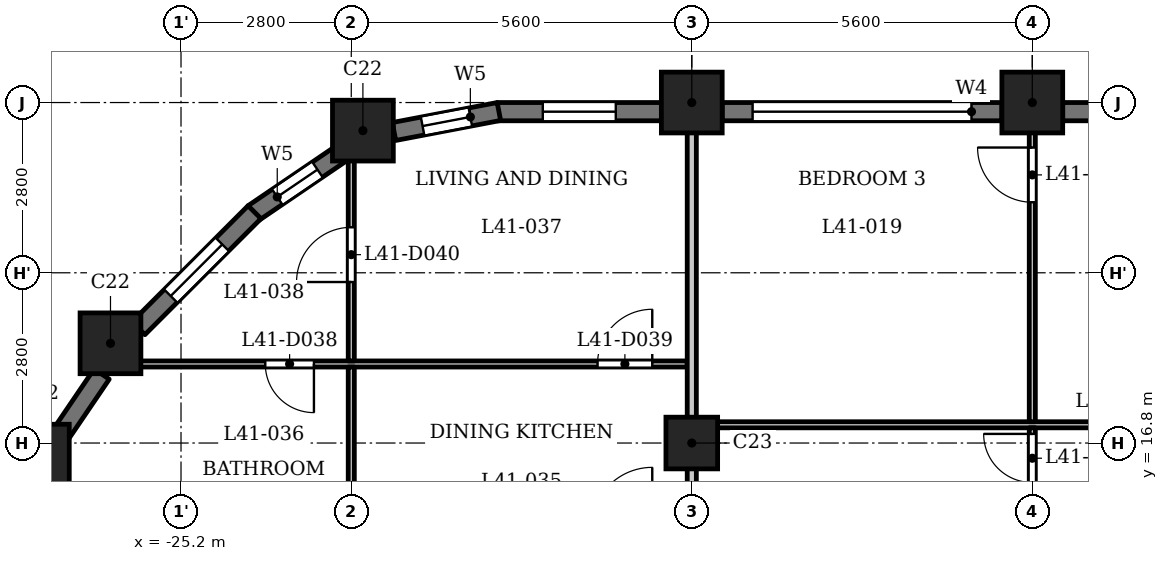
"""IFC4 building model, lengths in metres.
Left out: names, types, materials, properties, quantities, classifications, styles, units other than length and angle.
Written with IfcOpenShell. Run it as: python <this file> out.ifc"""

import sys

from ifc_helpers import new_model, si_unit, direction, frame, frame_2d, origin, origin_2d, place, context, subcontext, project, spatial, rectangle, extrude, element, fill, save


model = new_model("IFC4")
c1 = context("Model", 3, precision=1e-05, world=origin(), true_north=direction((0.0, 1.0)))
c2 = subcontext(c1, "Body", "Model", "MODEL_VIEW")
j1 = project(units=[si_unit("LENGTHUNIT", "METRE"), si_unit("PLANEANGLEUNIT", "RADIAN")], contexts=[c1])
p1 = place(None, origin())
s1 = spatial("IfcSite", under=j1, at=p1, CompositionType="ELEMENT")
p2 = place(p1, origin())
s2 = spatial("IfcBuilding", under=s1, at=p2, CompositionType="ELEMENT")
p3 = place(p2, frame((0.0, 0.0, 160.6)))
s3 = spatial("IfcBuildingStorey", under=s2, at=p3, CompositionType="ELEMENT", Elevation=160.6)
for number, where, z_axis, x_axis in (
    (1, (-11.2, 22.4, 0.0), (0.0, 0.0, 1.0), (1.0, 0.0, 0.0)),
    (2, (-16.8, 22.4, 0.0), (0.0, 0.0, 1.0), (1.0, 0.0, 0.0)),
    (3, (-22.209, 21.938, 0.0), (0.0, 0.0, 1.0), (1.0, 0.0, 0.0)),
    (4, (-26.36, 18.44, 0.0), (0.0, 0.0, 1.0), (1.0, 0.0, 0.0)),
    (5, (-27.538, 16.609, 0.0), (0.0, 0.0, 1.0), (1.0, 0.0, 0.0)),
):
    element("IfcColumn", number, at=place(p3, frame(where, z_axis=z_axis, x_axis=x_axis)), inside=s3, PredefinedType="COLUMN", context=c2, shape_type="SweptSolid", body=[
        extrude(rectangle(XDim=1.0, YDim=1.0, at=origin_2d()), origin(), (0.0, 0.0, 1.0), 3.5),
    ])
p4 = place(p3, frame((-16.8, 16.8, 0.0), z_axis=(0.0, 0.0, 1.0), x_axis=(1.0, 0.0, 0.0)))
e6 = element("IfcColumn", 6, at=p4, inside=s3, PredefinedType="COLUMN", context=c2, shape_type="SweptSolid", body=[
    extrude(rectangle(XDim=0.85, YDim=0.85, at=origin_2d()), origin(), (0.0, 0.0, 1.0), 3.5),
])
p5 = place(p3, frame((-6.1, 22.25, 0.0), z_axis=(0.0, 0.0, 1.0), x_axis=(-1.0, 0.0, 0.0)))
e7 = element("IfcWall", 7, at=p5, inside=s3, PredefinedType="SOLIDWALL", context=c2, shape_type="SweptSolid", body=[
    extrude(rectangle(XDim=4.6, YDim=0.3, at=frame_2d((2.3, 0.0))), origin(), (0.0, 0.0, 1.0), 2.45),
])
p6 = place(p5, frame((0.5, 0.0, 1.2)))
e8 = element("IfcOpeningElement", 8, at=p6, cuts=e7, PredefinedType="OPENING", context=c2, shape_type="SweptSolid", body=[
    extrude(rectangle(XDim=3.6, YDim=0.95, at=frame_2d((1.8, 0.475))), frame((0.0, 0.16, 0.0), z_axis=(0.0, -1.0, 0.0), x_axis=(1.0, 0.0, 0.0)), (0.0, 0.0, 1.0), 0.32),
])
p7 = place(p3, frame((-11.7, 22.25, 0.0), z_axis=(0.0, 0.0, 1.0), x_axis=(-1.0, 0.0, 0.0)))
e9 = element("IfcWall", 9, at=p7, inside=s3, PredefinedType="SOLIDWALL", context=c2, shape_type="SweptSolid", body=[
    extrude(rectangle(XDim=4.6, YDim=0.3, at=frame_2d((2.3, 0.0))), origin(), (0.0, 0.0, 1.0), 2.45),
])
p8 = place(p7, frame((0.5, 0.0, 1.2)))
e10 = element("IfcOpeningElement", 10, at=p8, cuts=e9, PredefinedType="OPENING", context=c2, shape_type="SweptSolid", body=[
    extrude(rectangle(XDim=3.6, YDim=0.95, at=frame_2d((1.8, 0.475))), frame((0.0, 0.16, 0.0), z_axis=(0.0, -1.0, 0.0), x_axis=(1.0, 0.0, 0.0)), (0.0, 0.0, 1.0), 0.32),
])
p9 = place(p3, frame((-17.3, 22.25, 0.0), z_axis=(0.0, 0.0, 1.0), x_axis=(-1.0, 0.0, 0.0)))
e11 = element("IfcWall", 11, at=p9, inside=s3, PredefinedType="SOLIDWALL", context=c2, shape_type="SweptSolid", body=[
    extrude(rectangle(XDim=2.7, YDim=0.3, at=frame_2d((1.35, 0.0))), origin(), (0.0, 0.0, 1.0), 2.45),
])
p10 = place(p9, frame((0.75, 0.0, 0.6)))
e12 = element("IfcOpeningElement", 12, at=p10, cuts=e11, PredefinedType="OPENING", context=c2, shape_type="SweptSolid", body=[
    extrude(rectangle(XDim=1.2, YDim=1.55, at=frame_2d((0.6, 0.775))), frame((0.0, 0.16, 0.0), z_axis=(0.0, -1.0, 0.0), x_axis=(1.0, 0.0, 0.0)), (0.0, 0.0, 1.0), 0.32),
])
p11 = place(p3, frame((-19.972, 22.253, 0.0), z_axis=(0.0, 0.0, 1.0), x_axis=(-0.982284988433, -0.187393173565, 0.0)))
e13 = element("IfcWall", 13, at=p11, inside=s3, PredefinedType="SOLIDWALL", context=c2, shape_type="SweptSolid", body=[
    extrude(rectangle(XDim=1.756, YDim=0.3, at=frame_2d((0.878, 0.0))), origin(), (0.0, 0.0, 1.0), 2.45),
])
p12 = place(p11, frame((0.478, 0.0, 0.6)))
e14 = element("IfcOpeningElement", 14, at=p12, cuts=e13, PredefinedType="OPENING", context=c2, shape_type="SweptSolid", body=[
    extrude(rectangle(XDim=0.8, YDim=1.55, at=frame_2d((0.4, 0.775))), frame((0.0, 0.16, 0.0), z_axis=(0.0, -1.0, 0.0), x_axis=(1.0, 0.0, 0.0)), (0.0, 0.0, 1.0), 0.32),
])
p13 = place(p3, frame((-22.56, 21.566, 0.0), z_axis=(0.0, 0.0, 1.0), x_axis=(-0.82707645233, -0.562089443061, 0.0)))
e15 = element("IfcWall", 15, at=p13, inside=s3, PredefinedType="SOLIDWALL", context=c2, shape_type="SweptSolid", body=[
    extrude(rectangle(XDim=1.756, YDim=0.3, at=frame_2d((0.878, 0.0))), origin(), (0.0, 0.0, 1.0), 2.45),
])
p14 = place(p13, frame((0.478, 0.0, 0.6)))
e16 = element("IfcOpeningElement", 16, at=p14, cuts=e15, PredefinedType="OPENING", context=c2, shape_type="SweptSolid", body=[
    extrude(rectangle(XDim=0.8, YDim=1.55, at=frame_2d((0.4, 0.775))), frame((0.0, 0.16, 0.0), z_axis=(0.0, -1.0, 0.0), x_axis=(1.0, 0.0, 0.0)), (0.0, 0.0, 1.0), 0.32),
])
p15 = place(p3, frame((-23.991, 20.597, 0.0), z_axis=(0.0, 0.0, 1.0), x_axis=(-0.707106781187, -0.707106781187, 0.0)))
e17 = element("IfcWall", 17, at=p15, inside=s3, PredefinedType="SOLIDWALL", context=c2, shape_type="SweptSolid", body=[
    extrude(rectangle(XDim=2.7, YDim=0.3, at=frame_2d((1.35, 0.0))), origin(), (0.0, 0.0, 1.0), 2.45),
])
p16 = place(p15, frame((0.75, 0.0, 0.6)))
e18 = element("IfcOpeningElement", 18, at=p16, cuts=e17, PredefinedType="OPENING", context=c2, shape_type="SweptSolid", body=[
    extrude(rectangle(XDim=1.2, YDim=1.55, at=frame_2d((0.6, 0.775))), frame((0.0, 0.16, 0.0), z_axis=(0.0, -1.0, 0.0), x_axis=(1.0, 0.0, 0.0)), (0.0, 0.0, 1.0), 0.32),
])
p17 = place(p3, frame((-26.504, 17.934, 0.0), z_axis=(0.0, 0.0, 1.0), x_axis=(-0.562145470373, -0.827038372833, 0.0)))
e19 = element("IfcWall", 19, at=p17, inside=s3, PredefinedType="SOLIDWALL", context=c2, shape_type="SweptSolid", body=[
    extrude(rectangle(XDim=1.177, YDim=0.3, at=frame_2d((0.588, 0.0))), origin(), (0.0, 0.0, 1.0), 3.2),
])
p18 = place(p3, frame((-16.725, 17.1, 0.0), z_axis=(0.0, 0.0, 1.0), x_axis=(1.0, 0.0, 0.0)))
e20 = element("IfcWall", 20, at=p18, inside=s3, PredefinedType="PARTITIONING", context=c2, shape_type="SweptSolid", body=[
    extrude(rectangle(XDim=33.45, YDim=0.1, at=frame_2d((16.725, 0.0))), origin(), (0.0, 0.0, 1.0), 3.2),
])
p19 = place(p18, frame((11.925, 0.0, 0.0)))
e21 = element("IfcOpeningElement", 21, at=p19, cuts=e20, PredefinedType="OPENING", context=c2, shape_type="SweptSolid", body=[
    extrude(rectangle(XDim=0.9, YDim=2.1, at=frame_2d((0.45, 1.05))), frame((0.0, 0.06, 0.0), z_axis=(0.0, -1.0, 0.0), x_axis=(1.0, 0.0, 0.0)), (0.0, 0.0, 1.0), 0.12),
])
p20 = place(p18, frame((15.175, 0.0, 0.0)))
e22 = element("IfcOpeningElement", 22, at=p20, cuts=e20, PredefinedType="OPENING", context=c2, shape_type="SweptSolid", body=[
    extrude(rectangle(XDim=0.9, YDim=2.1, at=frame_2d((0.45, 1.05))), frame((0.0, 0.06, 0.0), z_axis=(0.0, -1.0, 0.0), x_axis=(1.0, 0.0, 0.0)), (0.0, 0.0, 1.0), 0.12),
])
p21 = place(p18, frame((6.575, 0.0, 0.0)))
e23 = element("IfcOpeningElement", 23, at=p21, cuts=e20, PredefinedType="OPENING", context=c2, shape_type="SweptSolid", body=[
    extrude(rectangle(XDim=0.9, YDim=2.1, at=frame_2d((0.45, 1.05))), frame((0.0, 0.06, 0.0), z_axis=(0.0, -1.0, 0.0), x_axis=(1.0, 0.0, 0.0)), (0.0, 0.0, 1.0), 0.12),
])
p22 = place(p18, frame((17.375, 0.0, 0.0)))
e24 = element("IfcOpeningElement", 24, at=p22, cuts=e20, PredefinedType="OPENING", context=c2, shape_type="SweptSolid", body=[
    extrude(rectangle(XDim=0.8, YDim=2.1, at=frame_2d((0.4, 1.05))), frame((0.0, 0.06, 0.0), z_axis=(0.0, -1.0, 0.0), x_axis=(1.0, 0.0, 0.0)), (0.0, 0.0, 1.0), 0.12),
])
p23 = place(p18, frame((20.025, 0.0, 0.0)))
e25 = element("IfcOpeningElement", 25, at=p23, cuts=e20, PredefinedType="OPENING", context=c2, shape_type="SweptSolid", body=[
    extrude(rectangle(XDim=0.9, YDim=2.1, at=frame_2d((0.45, 1.05))), frame((0.0, 0.06, 0.0), z_axis=(0.0, -1.0, 0.0), x_axis=(1.0, 0.0, 0.0)), (0.0, 0.0, 1.0), 0.12),
])
p24 = place(p18, frame((26.425, 0.0, 0.0)))
e26 = element("IfcOpeningElement", 26, at=p24, cuts=e20, PredefinedType="OPENING", context=c2, shape_type="SweptSolid", body=[
    extrude(rectangle(XDim=0.8, YDim=2.1, at=frame_2d((0.4, 1.05))), frame((0.0, 0.06, 0.0), z_axis=(0.0, -1.0, 0.0), x_axis=(1.0, 0.0, 0.0)), (0.0, 0.0, 1.0), 0.12),
])
p25 = place(p18, frame((23.025, 0.0, 0.0)))
e27 = element("IfcOpeningElement", 27, at=p25, cuts=e20, PredefinedType="OPENING", context=c2, shape_type="SweptSolid", body=[
    extrude(rectangle(XDim=0.9, YDim=2.1, at=frame_2d((0.45, 1.05))), frame((0.0, 0.06, 0.0), z_axis=(0.0, -1.0, 0.0), x_axis=(1.0, 0.0, 0.0)), (0.0, 0.0, 1.0), 0.12),
])
p26 = place(p18, frame((28.575, 0.0, 0.0)))
e28 = element("IfcOpeningElement", 28, at=p26, cuts=e20, PredefinedType="OPENING", context=c2, shape_type="SweptSolid", body=[
    extrude(rectangle(XDim=0.8, YDim=2.1, at=frame_2d((0.4, 1.05))), frame((0.0, 0.06, 0.0), z_axis=(0.0, -1.0, 0.0), x_axis=(1.0, 0.0, 0.0)), (0.0, 0.0, 1.0), 0.12),
])
p27 = place(p18, frame((30.725, 0.0, 0.0)))
e29 = element("IfcOpeningElement", 29, at=p27, cuts=e20, PredefinedType="OPENING", context=c2, shape_type="SweptSolid", body=[
    extrude(rectangle(XDim=0.9, YDim=2.1, at=frame_2d((0.45, 1.05))), frame((0.0, 0.06, 0.0), z_axis=(0.0, -1.0, 0.0), x_axis=(1.0, 0.0, 0.0)), (0.0, 0.0, 1.0), 0.12),
])
p28 = place(p3, frame((-26.44, 18.1, 0.0), z_axis=(0.0, 0.0, 1.0), x_axis=(1.0, 0.0, 0.0)))
e30 = element("IfcWall", 30, at=p28, inside=s3, PredefinedType="PARTITIONING", context=c2, shape_type="SweptSolid", body=[
    extrude(rectangle(XDim=9.565, YDim=0.1, at=frame_2d((4.782, 0.0))), origin(), (0.0, 0.0, 1.0), 3.2),
])
p29 = place(p28, frame((2.626, 0.0, 0.0)))
e31 = element("IfcOpeningElement", 31, at=p29, cuts=e30, PredefinedType="OPENING", context=c2, shape_type="SweptSolid", body=[
    extrude(rectangle(XDim=0.8, YDim=2.1, at=frame_2d((0.4, 1.05))), frame((0.0, 0.06, 0.0), z_axis=(0.0, -1.0, 0.0), x_axis=(1.0, 0.0, 0.0)), (0.0, 0.0, 1.0), 0.12),
])
p30 = place(p28, frame((8.09, 0.0, 0.0)))
e32 = element("IfcOpeningElement", 32, at=p30, cuts=e30, PredefinedType="OPENING", context=c2, shape_type="SweptSolid", body=[
    extrude(rectangle(XDim=0.9, YDim=2.1, at=frame_2d((0.45, 1.05))), frame((0.0, 0.06, 0.0), z_axis=(0.0, -1.0, 0.0), x_axis=(1.0, 0.0, 0.0)), (0.0, 0.0, 1.0), 0.12),
])
p31 = place(p3, frame((-22.4, 15.475, 0.0), z_axis=(0.0, 0.0, 1.0), x_axis=(0.0, 1.0, 0.0)))
e33 = element("IfcWall", 33, at=p31, inside=s3, PredefinedType="PARTITIONING", context=c2, shape_type="SweptSolid", body=[
    extrude(rectangle(XDim=2.575, YDim=0.1, at=frame_2d((1.288, 0.0))), origin(), (0.0, 0.0, 1.0), 3.2),
])
p32 = place(p3, frame((-22.4, 18.15, 0.0), z_axis=(0.0, 0.0, 1.0), x_axis=(0.0, 1.0, 0.0)))
e34 = element("IfcWall", 34, at=p32, inside=s3, PredefinedType="PARTITIONING", context=c2, shape_type="SweptSolid", body=[
    extrude(rectangle(XDim=3.57, YDim=0.1, at=frame_2d((1.785, 0.0))), origin(), (0.0, 0.0, 1.0), 3.2),
])
p33 = place(p32, frame((1.298, 0.0, 0.0)))
e35 = element("IfcOpeningElement", 35, at=p33, cuts=e34, PredefinedType="OPENING", context=c2, shape_type="SweptSolid", body=[
    extrude(rectangle(XDim=0.9, YDim=2.1, at=frame_2d((0.45, 1.05))), frame((0.0, 0.06, 0.0), z_axis=(0.0, -1.0, 0.0), x_axis=(1.0, 0.0, 0.0)), (0.0, 0.0, 1.0), 0.12),
])
p34 = place(p3, frame((-16.8, 15.475, 0.0), z_axis=(0.0, 0.0, 1.0), x_axis=(0.0, 1.0, 0.0)))
e36 = element("IfcWall", 36, at=p34, inside=s3, PredefinedType="PARTITIONING", context=c2, shape_type="SweptSolid", body=[
    extrude(rectangle(XDim=7.405, YDim=0.15, at=frame_2d((3.702, 0.0))), origin(), (0.0, 0.0, 1.0), 3.2),
])
p35 = place(p3, frame((-11.2, 13.275, 0.0), z_axis=(0.0, 0.0, 1.0), x_axis=(0.0, 1.0, 0.0)))
e37 = element("IfcWall", 37, at=p35, inside=s3, PredefinedType="PARTITIONING", context=c2, shape_type="SweptSolid", body=[
    extrude(rectangle(XDim=3.775, YDim=0.1, at=frame_2d((1.888, 0.0))), origin(), (0.0, 0.0, 1.0), 3.2),
])
p36 = place(p35, frame((2.875, 0.0, 0.0)))
e38 = element("IfcOpeningElement", 38, at=p36, cuts=e37, PredefinedType="OPENING", context=c2, shape_type="SweptSolid", body=[
    extrude(rectangle(XDim=0.8, YDim=2.1, at=frame_2d((0.4, 1.05))), frame((0.0, 0.06, 0.0), z_axis=(0.0, -1.0, 0.0), x_axis=(1.0, 0.0, 0.0)), (0.0, 0.0, 1.0), 0.12),
])
p37 = place(p3, frame((-11.2, 17.15, 0.0), z_axis=(0.0, 0.0, 1.0), x_axis=(0.0, 1.0, 0.0)))
e39 = element("IfcWall", 39, at=p37, inside=s3, PredefinedType="PARTITIONING", context=c2, shape_type="SweptSolid", body=[
    extrude(rectangle(XDim=5.73, YDim=0.1, at=frame_2d((2.865, 0.0))), origin(), (0.0, 0.0, 1.0), 3.2),
])
p38 = place(p37, frame((3.61, 0.0, 0.0)))
e40 = element("IfcOpeningElement", 40, at=p38, cuts=e39, PredefinedType="OPENING", context=c2, shape_type="SweptSolid", body=[
    extrude(rectangle(XDim=0.9, YDim=2.1, at=frame_2d((0.45, 1.05))), frame((0.0, 0.06, 0.0), z_axis=(0.0, -1.0, 0.0), x_axis=(1.0, 0.0, 0.0)), (0.0, 0.0, 1.0), 0.12),
])
p39 = place(p36, origin())
e41 = element("IfcDoor", 41, at=p39, inside=s3, OperationType="SINGLE_SWING_LEFT", PredefinedType="DOOR", context=c2, shape_type="SweptSolid", body=[
    extrude(rectangle(XDim=0.8, YDim=2.1, at=frame_2d((0.4, 1.05))), frame((0.0, 0.025, 0.0), z_axis=(0.0, -1.0, 0.0), x_axis=(1.0, 0.0, 0.0)), (0.0, 0.0, 1.0), 0.05),
])
fill(e38, e41)
p40 = place(p38, origin())
e42 = element("IfcDoor", 42, at=p40, inside=s3, OperationType="SINGLE_SWING_LEFT", PredefinedType="DOOR", context=c2, shape_type="SweptSolid", body=[
    extrude(rectangle(XDim=0.9, YDim=2.1, at=frame_2d((0.45, 1.05))), frame((0.0, 0.025, 0.0), z_axis=(0.0, -1.0, 0.0), x_axis=(1.0, 0.0, 0.0)), (0.0, 0.0, 1.0), 0.05),
])
fill(e40, e42)
p41 = place(p29, origin())
e43 = element("IfcDoor", 43, at=p41, inside=s3, OperationType="SINGLE_SWING_RIGHT", PredefinedType="DOOR", context=c2, shape_type="SweptSolid", body=[
    extrude(rectangle(XDim=0.8, YDim=2.1, at=frame_2d((0.4, 1.05))), frame((0.0, 0.025, 0.0), z_axis=(0.0, -1.0, 0.0), x_axis=(1.0, 0.0, 0.0)), (0.0, 0.0, 1.0), 0.05),
])
fill(e31, e43)
p42 = place(p30, origin())
e44 = element("IfcDoor", 44, at=p42, inside=s3, OperationType="SINGLE_SWING_LEFT", PredefinedType="DOOR", context=c2, shape_type="SweptSolid", body=[
    extrude(rectangle(XDim=0.9, YDim=2.1, at=frame_2d((0.45, 1.05))), frame((0.0, 0.025, 0.0), z_axis=(0.0, -1.0, 0.0), x_axis=(1.0, 0.0, 0.0)), (0.0, 0.0, 1.0), 0.05),
])
fill(e32, e44)
p43 = place(p33, origin())
e45 = element("IfcDoor", 45, at=p43, inside=s3, OperationType="SINGLE_SWING_RIGHT", PredefinedType="DOOR", context=c2, shape_type="SweptSolid", body=[
    extrude(rectangle(XDim=0.9, YDim=2.1, at=frame_2d((0.45, 1.05))), frame((0.0, 0.025, 0.0), z_axis=(0.0, -1.0, 0.0), x_axis=(1.0, 0.0, 0.0)), (0.0, 0.0, 1.0), 0.05),
])
fill(e35, e45)
p44 = place(p8, origin())
e46 = element("IfcWindow", 46, at=p44, inside=s3, PartitioningType="SINGLE_PANEL", PredefinedType="WINDOW", context=c2, shape_type="SweptSolid", body=[
    extrude(rectangle(XDim=3.6, YDim=0.95, at=frame_2d((1.8, 0.475))), frame((0.0, 0.03, 0.0), z_axis=(0.0, -1.0, 0.0), x_axis=(1.0, 0.0, 0.0)), (0.0, 0.0, 1.0), 0.06),
])
fill(e10, e46)
p45 = place(p10, origin())
e47 = element("IfcWindow", 47, at=p45, inside=s3, PartitioningType="SINGLE_PANEL", PredefinedType="WINDOW", context=c2, shape_type="SweptSolid", body=[
    extrude(rectangle(XDim=1.2, YDim=1.55, at=frame_2d((0.6, 0.775))), frame((0.0, 0.03, 0.0), z_axis=(0.0, -1.0, 0.0), x_axis=(1.0, 0.0, 0.0)), (0.0, 0.0, 1.0), 0.06),
])
fill(e12, e47)
p46 = place(p12, origin())
e48 = element("IfcWindow", 48, at=p46, inside=s3, PartitioningType="SINGLE_PANEL", PredefinedType="WINDOW", context=c2, shape_type="SweptSolid", body=[
    extrude(rectangle(XDim=0.8, YDim=1.55, at=frame_2d((0.4, 0.775))), frame((0.0, 0.03, 0.0), z_axis=(0.0, -1.0, 0.0), x_axis=(1.0, 0.0, 0.0)), (0.0, 0.0, 1.0), 0.06),
])
fill(e14, e48)
p47 = place(p14, origin())
e49 = element("IfcWindow", 49, at=p47, inside=s3, PartitioningType="SINGLE_PANEL", PredefinedType="WINDOW", context=c2, shape_type="SweptSolid", body=[
    extrude(rectangle(XDim=0.8, YDim=1.55, at=frame_2d((0.4, 0.775))), frame((0.0, 0.03, 0.0), z_axis=(0.0, -1.0, 0.0), x_axis=(1.0, 0.0, 0.0)), (0.0, 0.0, 1.0), 0.06),
])
fill(e16, e49)
p48 = place(p16, origin())
e50 = element("IfcWindow", 50, at=p48, inside=s3, PartitioningType="SINGLE_PANEL", PredefinedType="WINDOW", context=c2, shape_type="SweptSolid", body=[
    extrude(rectangle(XDim=1.2, YDim=1.55, at=frame_2d((0.6, 0.775))), frame((0.0, 0.03, 0.0), z_axis=(0.0, -1.0, 0.0), x_axis=(1.0, 0.0, 0.0)), (0.0, 0.0, 1.0), 0.06),
])
fill(e18, e50)
save(model, sys.argv[1])
